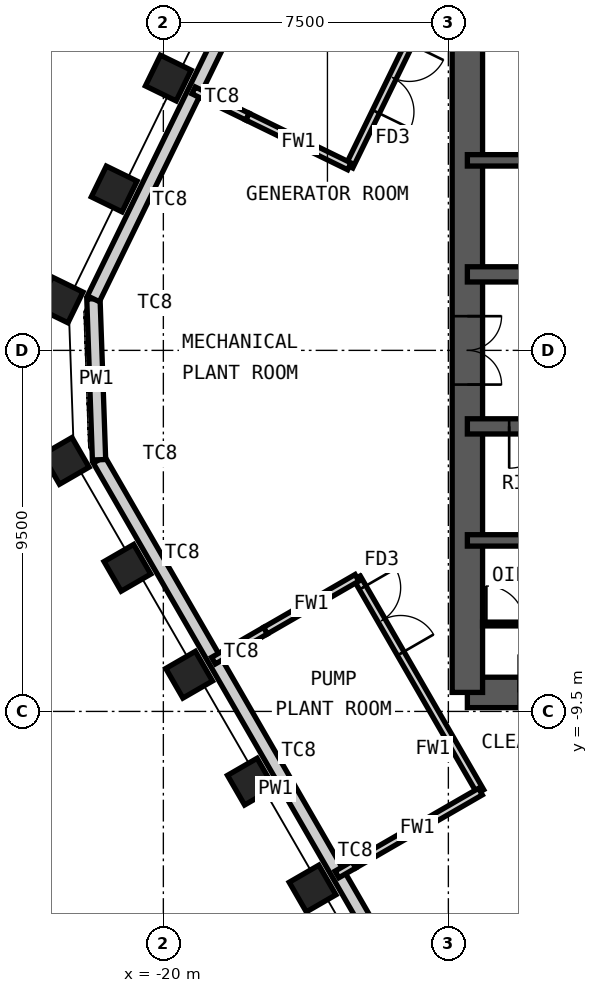
"""IFC4 building model, lengths in metres.
Left out: names, types, materials, properties, quantities, classifications, styles, units other than length and angle.
Written with IfcOpenShell. Run it as: python <this file> out.ifc"""

import sys

from ifc_helpers import new_model, si_unit, direction, frame, frame_2d, origin, origin_2d, place, context, subcontext, project, spatial, rectangle, hollow_rectangle, extrude, element, fill, save


model = new_model("IFC4")
c1 = context("Model", 3, precision=1e-05, world=origin(), true_north=direction((0.0, 1.0)))
c2 = subcontext(c1, "Body", "Model", "MODEL_VIEW")
j1 = project(units=[si_unit("LENGTHUNIT", "METRE"), si_unit("PLANEANGLEUNIT", "RADIAN")], contexts=[c1])
p1 = place(None, origin())
s1 = spatial("IfcSite", under=j1, at=p1, CompositionType="ELEMENT")
p2 = place(p1, origin())
s2 = spatial("IfcBuilding", under=s1, at=p2, CompositionType="ELEMENT")
p3 = place(p2, frame((0.0, 0.0, 343.6)))
s3 = spatial("IfcBuildingStorey", under=s2, at=p3, CompositionType="ELEMENT", Elevation=343.6)
for number, where, z_axis, x_axis in (
    (1, (-16.073, -14.16, 0.0), (0.0, 0.0, 1.0), (0.5, -0.866, 0.0)),
    (2, (-17.698, -11.347, 0.0), (0.0, 0.0, 1.0), (0.5, -0.866, 0.0)),
    (3, (-19.322, -8.534, 0.0), (0.0, 0.0, 1.0), (0.5, -0.866, 0.0)),
    (4, (-20.946, -5.721, 0.0), (0.0, 0.0, 1.0), (0.5, -0.866, 0.0)),
    (5, (-22.57, -2.908, 0.0), (0.0, 0.0, 1.0), (0.5, -0.866, 0.0)),
    (6, (-22.717, 1.327, 0.0), (0.0, 0.0, 1.0), (-0.438, -0.899, 0.0)),
    (7, (-21.293, 4.246, 0.0), (0.0, 0.0, 1.0), (-0.438, -0.899, 0.0)),
    (8, (-19.87, 7.166, 0.0), (0.0, 0.0, 1.0), (-0.438, -0.899, 0.0)),
):
    element("IfcColumn", number, at=place(p3, frame(where, z_axis=z_axis, x_axis=x_axis)), inside=s3, PredefinedType="COLUMN", context=c2, shape_type="SweptSolid", body=[
        extrude(hollow_rectangle(XDim=0.9, YDim=0.9, WallThickness=0.05, at=origin_2d()), origin(), (0.0, 0.0, 1.0), 4.65),
    ])
p4 = place(p3, frame((-12.0, -9.0, 0.0), z_axis=(0.0, 0.0, 1.0), x_axis=(1.0, 0.0, 0.0)))
e9 = element("IfcWall", 9, at=p4, inside=s3, PredefinedType="SHEAR", context=c2, shape_type="SweptSolid", body=[
    extrude(rectangle(XDim=24.0, YDim=0.8, at=frame_2d((12.0, 0.0))), origin(), (0.0, 0.0, 1.0), 4.65),
])
p5 = place(p4, frame((1.35, 0.0, 0.0)))
e10 = element("IfcOpeningElement", 10, at=p5, cuts=e9, PredefinedType="OPENING", context=c2, shape_type="SweptSolid", body=[
    extrude(rectangle(XDim=1.0, YDim=2.1, at=frame_2d((0.5, 1.05))), frame((0.0, 0.41, 0.0), z_axis=(0.0, -1.0, 0.0), x_axis=(1.0, 0.0, 0.0)), (0.0, 0.0, 1.0), 0.82),
])
p6 = place(p4, frame((5.325, 0.0, 0.0)))
e11 = element("IfcOpeningElement", 11, at=p6, cuts=e9, PredefinedType="OPENING", context=c2, shape_type="SweptSolid", body=[
    extrude(rectangle(XDim=1.15, YDim=2.1, at=frame_2d((0.575, 1.05))), frame((0.0, 0.41, 0.0), z_axis=(0.0, -1.0, 0.0), x_axis=(1.0, 0.0, 0.0)), (0.0, 0.0, 1.0), 0.82),
])
p7 = place(p4, frame((12.6, 0.0, 0.0)))
e12 = element("IfcOpeningElement", 12, at=p7, cuts=e9, PredefinedType="OPENING", context=c2, shape_type="SweptSolid", body=[
    extrude(rectangle(XDim=1.0, YDim=2.1, at=frame_2d((0.5, 1.05))), frame((0.0, 0.41, 0.0), z_axis=(0.0, -1.0, 0.0), x_axis=(1.0, 0.0, 0.0)), (0.0, 0.0, 1.0), 0.82),
])
p8 = place(p3, frame((-12.0, -9.0, 0.0), z_axis=(0.0, 0.0, 1.0), x_axis=(0.0, 1.0, 0.0)))
e13 = element("IfcWall", 13, at=p8, inside=s3, PredefinedType="SHEAR", context=c2, shape_type="SweptSolid", body=[
    extrude(rectangle(XDim=18.0, YDim=0.8, at=frame_2d((9.0, 0.0))), origin(), (0.0, 0.0, 1.0), 4.65),
])
p9 = place(p8, frame((8.1, 0.0, 0.0)))
e14 = element("IfcOpeningElement", 14, at=p9, cuts=e13, PredefinedType="OPENING", context=c2, shape_type="SweptSolid", body=[
    extrude(rectangle(XDim=1.8, YDim=2.1, at=frame_2d((0.9, 1.05))), frame((0.0, 0.41, 0.0), z_axis=(0.0, -1.0, 0.0), x_axis=(1.0, 0.0, 0.0)), (0.0, 0.0, 1.0), 0.82),
])
p10 = place(p3, frame((-12.0, 5.0, 0.0), z_axis=(0.0, 0.0, 1.0), x_axis=(1.0, 0.0, 0.0)))
e15 = element("IfcWall", 15, at=p10, inside=s3, PredefinedType="SHEAR", context=c2, shape_type="SweptSolid", body=[
    extrude(rectangle(XDim=24.0, YDim=0.3, at=frame_2d((12.0, 0.0))), origin(), (0.0, 0.0, 1.0), 4.65),
])
p11 = place(p3, frame((-12.0, 2.0, 0.0), z_axis=(0.0, 0.0, 1.0), x_axis=(1.0, 0.0, 0.0)))
e16 = element("IfcWall", 16, at=p11, inside=s3, PredefinedType="SHEAR", context=c2, shape_type="SweptSolid", body=[
    extrude(rectangle(XDim=24.0, YDim=0.4, at=frame_2d((12.0, 0.0))), origin(), (0.0, 0.0, 1.0), 4.65),
])
p12 = place(p11, frame((2.4, 0.0, 0.0)))
e17 = element("IfcOpeningElement", 17, at=p12, cuts=e16, PredefinedType="OPENING", context=c2, shape_type="SweptSolid", body=[
    extrude(rectangle(XDim=1.1, YDim=2.1, at=frame_2d((0.55, 1.05))), frame((0.0, 0.21, 0.0), z_axis=(0.0, -1.0, 0.0), x_axis=(1.0, 0.0, 0.0)), (0.0, 0.0, 1.0), 0.42),
])
p13 = place(p11, frame((22.0, 0.0, 0.0)))
e18 = element("IfcOpeningElement", 18, at=p13, cuts=e16, PredefinedType="OPENING", context=c2, shape_type="SweptSolid", body=[
    extrude(rectangle(XDim=1.1, YDim=2.1, at=frame_2d((0.55, 1.05))), frame((0.0, 0.21, 0.0), z_axis=(0.0, -1.0, 0.0), x_axis=(1.0, 0.0, 0.0)), (0.0, 0.0, 1.0), 0.42),
])
p14 = place(p11, frame((10.15, 0.0, 0.0)))
e19 = element("IfcOpeningElement", 19, at=p14, cuts=e16, PredefinedType="OPENING", context=c2, shape_type="SweptSolid", body=[
    extrude(rectangle(XDim=1.0, YDim=2.1, at=frame_2d((0.5, 1.05))), frame((0.0, 0.21, 0.0), z_axis=(0.0, -1.0, 0.0), x_axis=(1.0, 0.0, 0.0)), (0.0, 0.0, 1.0), 0.42),
])
p15 = place(p11, frame((6.9, 0.0, 0.0)))
e20 = element("IfcOpeningElement", 20, at=p15, cuts=e16, PredefinedType="OPENING", context=c2, shape_type="SweptSolid", body=[
    extrude(rectangle(XDim=1.0, YDim=2.1, at=frame_2d((0.5, 1.05))), frame((0.0, 0.21, 0.0), z_axis=(0.0, -1.0, 0.0), x_axis=(1.0, 0.0, 0.0)), (0.0, 0.0, 1.0), 0.42),
])
p16 = place(p11, frame((13.4, 0.0, 0.0)))
e21 = element("IfcOpeningElement", 21, at=p16, cuts=e16, PredefinedType="OPENING", context=c2, shape_type="SweptSolid", body=[
    extrude(rectangle(XDim=1.0, YDim=2.1, at=frame_2d((0.5, 1.05))), frame((0.0, 0.21, 0.0), z_axis=(0.0, -1.0, 0.0), x_axis=(1.0, 0.0, 0.0)), (0.0, 0.0, 1.0), 0.42),
])
p17 = place(p11, frame((16.2, 0.0, 0.0)))
e22 = element("IfcOpeningElement", 22, at=p17, cuts=e16, PredefinedType="OPENING", context=c2, shape_type="SweptSolid", body=[
    extrude(rectangle(XDim=1.0, YDim=2.1, at=frame_2d((0.5, 1.05))), frame((0.0, 0.21, 0.0), z_axis=(0.0, -1.0, 0.0), x_axis=(1.0, 0.0, 0.0)), (0.0, 0.0, 1.0), 0.42),
])
p18 = place(p11, frame((19.0, 0.0, 0.0)))
e23 = element("IfcOpeningElement", 23, at=p18, cuts=e16, PredefinedType="OPENING", context=c2, shape_type="SweptSolid", body=[
    extrude(rectangle(XDim=1.0, YDim=2.1, at=frame_2d((0.5, 1.05))), frame((0.0, 0.21, 0.0), z_axis=(0.0, -1.0, 0.0), x_axis=(1.0, 0.0, 0.0)), (0.0, 0.0, 1.0), 0.42),
])
p19 = place(p3, frame((-12.0, -2.0, 0.0), z_axis=(0.0, 0.0, 1.0), x_axis=(1.0, 0.0, 0.0)))
e24 = element("IfcWall", 24, at=p19, inside=s3, PredefinedType="SHEAR", context=c2, shape_type="SweptSolid", body=[
    extrude(rectangle(XDim=24.0, YDim=0.4, at=frame_2d((12.0, 0.0))), origin(), (0.0, 0.0, 1.0), 4.65),
])
p20 = place(p19, frame((1.1, 0.0, 0.0)))
e25 = element("IfcOpeningElement", 25, at=p20, cuts=e24, PredefinedType="OPENING", context=c2, shape_type="SweptSolid", body=[
    extrude(rectangle(XDim=1.1, YDim=2.1, at=frame_2d((0.55, 1.05))), frame((0.0, 0.21, 0.0), z_axis=(0.0, -1.0, 0.0), x_axis=(1.0, 0.0, 0.0)), (0.0, 0.0, 1.0), 0.42),
])
p21 = place(p19, frame((13.55, 0.0, 0.0)))
e26 = element("IfcOpeningElement", 26, at=p21, cuts=e24, PredefinedType="OPENING", context=c2, shape_type="SweptSolid", body=[
    extrude(rectangle(XDim=1.1, YDim=2.1, at=frame_2d((0.55, 1.05))), frame((0.0, 0.21, 0.0), z_axis=(0.0, -1.0, 0.0), x_axis=(1.0, 0.0, 0.0)), (0.0, 0.0, 1.0), 0.42),
])
p22 = place(p19, frame((20.7, 0.0, 0.0)))
e27 = element("IfcOpeningElement", 27, at=p22, cuts=e24, PredefinedType="OPENING", context=c2, shape_type="SweptSolid", body=[
    extrude(rectangle(XDim=1.1, YDim=2.1, at=frame_2d((0.55, 1.05))), frame((0.0, 0.21, 0.0), z_axis=(0.0, -1.0, 0.0), x_axis=(1.0, 0.0, 0.0)), (0.0, 0.0, 1.0), 0.42),
])
p23 = place(p19, frame((4.0, 0.0, 0.0)))
e28 = element("IfcOpeningElement", 28, at=p23, cuts=e24, PredefinedType="OPENING", context=c2, shape_type="SweptSolid", body=[
    extrude(rectangle(XDim=1.0, YDim=2.1, at=frame_2d((0.5, 1.05))), frame((0.0, 0.21, 0.0), z_axis=(0.0, -1.0, 0.0), x_axis=(1.0, 0.0, 0.0)), (0.0, 0.0, 1.0), 0.42),
])
p24 = place(p19, frame((6.8, 0.0, 0.0)))
e29 = element("IfcOpeningElement", 29, at=p24, cuts=e24, PredefinedType="OPENING", context=c2, shape_type="SweptSolid", body=[
    extrude(rectangle(XDim=1.0, YDim=2.1, at=frame_2d((0.5, 1.05))), frame((0.0, 0.21, 0.0), z_axis=(0.0, -1.0, 0.0), x_axis=(1.0, 0.0, 0.0)), (0.0, 0.0, 1.0), 0.42),
])
p25 = place(p19, frame((9.6, 0.0, 0.0)))
e30 = element("IfcOpeningElement", 30, at=p25, cuts=e24, PredefinedType="OPENING", context=c2, shape_type="SweptSolid", body=[
    extrude(rectangle(XDim=1.0, YDim=2.1, at=frame_2d((0.5, 1.05))), frame((0.0, 0.21, 0.0), z_axis=(0.0, -1.0, 0.0), x_axis=(1.0, 0.0, 0.0)), (0.0, 0.0, 1.0), 0.42),
])
p26 = place(p3, frame((-12.0, -5.0, 0.0), z_axis=(0.0, 0.0, 1.0), x_axis=(1.0, 0.0, 0.0)))
e31 = element("IfcWall", 31, at=p26, inside=s3, PredefinedType="SHEAR", context=c2, shape_type="SweptSolid", body=[
    extrude(rectangle(XDim=24.0, YDim=0.3, at=frame_2d((12.0, 0.0))), origin(), (0.0, 0.0, 1.0), 4.65),
])
p27 = place(p3, frame((-12.396, -18.979, 5.0), z_axis=(0.0, 0.0, 1.0), x_axis=(-0.500003221507, 0.866023543838, 0.0)))
e32 = element("IfcWall", 32, at=p27, inside=s3, PredefinedType="PARAPET", context=c2, shape_type="SweptSolid", body=[
    extrude(rectangle(XDim=18.592, YDim=0.35, at=frame_2d((9.296, 0.0))), origin(), (0.0, 0.0, 1.0), 1.2),
])
p28 = place(p3, frame((-21.692, -2.878, 5.0), z_axis=(0.0, 0.0, 1.0), x_axis=(-0.034851142499, 0.999392514414, 0.0)))
e33 = element("IfcWall", 33, at=p28, inside=s3, PredefinedType="PARAPET", context=c2, shape_type="SweptSolid", body=[
    extrude(rectangle(XDim=4.238, YDim=0.35, at=frame_2d((2.119, 0.0))), origin(), (0.0, 0.0, 1.0), 1.2),
])
p29 = place(p3, frame((-21.84, 1.358, 5.0), z_axis=(0.0, 0.0, 1.0), x_axis=(0.438362055296, 0.89879848046, 0.0)))
e34 = element("IfcWall", 34, at=p29, inside=s3, PredefinedType="PARAPET", context=c2, shape_type="SweptSolid", body=[
    extrude(rectangle(XDim=18.592, YDim=0.35, at=frame_2d((9.296, 0.0))), origin(), (0.0, 0.0, 1.0), 1.2),
])
p30 = place(p3, frame((-11.6, -7.2, 0.0), z_axis=(0.0, 0.0, 1.0), x_axis=(1.0, 0.0, 0.0)))
e35 = element("IfcWall", 35, at=p30, inside=s3, PredefinedType="PARTITIONING", context=c2, shape_type="SweptSolid", body=[
    extrude(rectangle(XDim=3.25, YDim=0.1, at=frame_2d((1.625, 0.0))), origin(), (0.0, 0.0, 1.0), 5.0),
])
p31 = place(p30, frame((0.1, 0.0, 0.0)))
e36 = element("IfcOpeningElement", 36, at=p31, cuts=e35, PredefinedType="OPENING", context=c2, shape_type="SweptSolid", body=[
    extrude(rectangle(XDim=1.0, YDim=2.4, at=frame_2d((0.5, 1.2))), frame((0.0, 0.06, 0.0), z_axis=(0.0, -1.0, 0.0), x_axis=(1.0, 0.0, 0.0)), (0.0, 0.0, 1.0), 0.12),
])
p32 = place(p3, frame((-15.433, -13.79, 0.0), z_axis=(0.0, 0.0, 1.0), x_axis=(0.866114856374, 0.499845031553, 0.0)))
e37 = element("IfcWall", 37, at=p32, inside=s3, PredefinedType="PARTITIONING", context=c2, shape_type="SweptSolid", body=[
    extrude(rectangle(XDim=0.517, YDim=0.2, at=frame_2d((0.259, 0.0))), origin(), (0.0, 0.0, 1.0), 3.75),
])
p33 = place(p3, frame((-18.681, -8.164, 0.0), z_axis=(0.0, 0.0, 1.0), x_axis=(0.866049315463, 0.499958581471, 0.0)))
e38 = element("IfcWall", 38, at=p33, inside=s3, PredefinedType="PARTITIONING", context=c2, shape_type="SweptSolid", body=[
    extrude(rectangle(XDim=1.581, YDim=0.2, at=frame_2d((0.791, 0.0))), origin(), (0.0, 0.0, 1.0), 3.75),
])
p34 = place(p3, frame((-11.657, -11.61, 0.0), z_axis=(0.0, 0.0, 1.0), x_axis=(-0.500003318956, 0.866023487576, 0.0)))
e39 = element("IfcWall", 39, at=p34, inside=s3, PredefinedType="PARTITIONING", context=c2, shape_type="SweptSolid", body=[
    extrude(rectangle(XDim=6.496, YDim=0.2, at=frame_2d((3.248, 0.0))), origin(), (0.0, 0.0, 1.0), 4.65),
])
p35 = place(p34, frame((4.197, 0.0, 0.0)))
e40 = element("IfcOpeningElement", 40, at=p35, cuts=e39, PredefinedType="OPENING", context=c2, shape_type="SweptSolid", body=[
    extrude(rectangle(XDim=2.0, YDim=2.4, at=frame_2d((1.0, 1.2))), frame((0.0, 0.11, 0.0), z_axis=(0.0, -1.0, 0.0), x_axis=(1.0, 0.0, 0.0)), (0.0, 0.0, 1.0), 0.22),
])
p36 = place(p3, frame((-19.205, 6.841, 0.0), z_axis=(0.0, 0.0, 1.0), x_axis=(0.898769929808, -0.438420589472, 0.0)))
e41 = element("IfcWall", 41, at=p36, inside=s3, PredefinedType="PARTITIONING", context=c2, shape_type="SweptSolid", body=[
    extrude(rectangle(XDim=1.581, YDim=0.2, at=frame_2d((0.791, 0.0))), origin(), (0.0, 0.0, 1.0), 3.75),
])
p37 = place(p3, frame((-15.106, 4.842, 0.0), z_axis=(0.0, 0.0, 1.0), x_axis=(0.438397716114, 0.898781087087, 0.0)))
e42 = element("IfcWall", 42, at=p37, inside=s3, PredefinedType="PARTITIONING", context=c2, shape_type="SweptSolid", body=[
    extrude(rectangle(XDim=6.496, YDim=0.2, at=frame_2d((3.248, 0.0))), origin(), (0.0, 0.0, 1.0), 4.65),
])
p38 = place(p37, frame((1.598, 0.0, 0.0)))
e43 = element("IfcOpeningElement", 43, at=p38, cuts=e42, PredefinedType="OPENING", context=c2, shape_type="SweptSolid", body=[
    extrude(rectangle(XDim=2.0, YDim=2.4, at=frame_2d((1.0, 1.2))), frame((0.0, 0.11, 0.0), z_axis=(0.0, -1.0, 0.0), x_axis=(1.0, 0.0, 0.0)), (0.0, 0.0, 1.0), 0.22),
])
p39 = place(p3, frame((-14.985, -13.531, 0.0), z_axis=(0.0, 0.0, 1.0), x_axis=(0.866021594059, 0.50000659858, 0.0)))
e44 = element("IfcWall", 44, at=p39, inside=s3, PredefinedType="PARTITIONING", context=c2, shape_type="SweptSolid", body=[
    extrude(rectangle(XDim=3.843, YDim=0.2, at=frame_2d((1.921, 0.0))), origin(), (0.0, 0.0, 1.0), 4.65),
])
p40 = place(p3, frame((-17.311, -7.374, 0.0), z_axis=(0.0, 0.0, 1.0), x_axis=(0.86602318214, 0.500003847982, 0.0)))
e45 = element("IfcWall", 45, at=p40, inside=s3, PredefinedType="PARTITIONING", context=c2, shape_type="SweptSolid", body=[
    extrude(rectangle(XDim=2.779, YDim=0.2, at=frame_2d((1.389, 0.0))), origin(), (0.0, 0.0, 1.0), 4.65),
])
p41 = place(p3, frame((-17.784, 6.148, 0.0), z_axis=(0.0, 0.0, 1.0), x_axis=(0.898792861198, -0.438373576598, 0.0)))
e46 = element("IfcWall", 46, at=p41, inside=s3, PredefinedType="PARTITIONING", context=c2, shape_type="SweptSolid", body=[
    extrude(rectangle(XDim=2.979, YDim=0.2, at=frame_2d((1.49, 0.0))), origin(), (0.0, 0.0, 1.0), 4.65),
])
p42 = place(p20, origin())
e47 = element("IfcDoor", 47, at=p42, inside=s3, OperationType="SINGLE_SWING_LEFT", PredefinedType="DOOR", context=c2, shape_type="SweptSolid", body=[
    extrude(rectangle(XDim=1.1, YDim=2.1, at=frame_2d((0.55, 1.05))), frame((0.0, 0.025, 0.0), z_axis=(0.0, -1.0, 0.0), x_axis=(1.0, 0.0, 0.0)), (0.0, 0.0, 1.0), 0.05),
])
fill(e25, e47)
p43 = place(p9, origin())
e48 = element("IfcDoor", 48, at=p43, inside=s3, OperationType="DOUBLE_DOOR_DOUBLE_SWING", PredefinedType="DOOR", context=c2, shape_type="SweptSolid", body=[
    extrude(rectangle(XDim=1.8, YDim=2.1, at=frame_2d((0.9, 1.05))), frame((0.0, 0.025, 0.0), z_axis=(0.0, -1.0, 0.0), x_axis=(1.0, 0.0, 0.0)), (0.0, 0.0, 1.0), 0.05),
])
fill(e14, e48)
p44 = place(p31, origin())
e49 = element("IfcDoor", 49, at=p44, inside=s3, OperationType="SINGLE_SWING_RIGHT", PredefinedType="DOOR", context=c2, shape_type="SweptSolid", body=[
    extrude(rectangle(XDim=1.0, YDim=2.4, at=frame_2d((0.5, 1.2))), frame((0.0, 0.025, 0.0), z_axis=(0.0, -1.0, 0.0), x_axis=(1.0, 0.0, 0.0)), (0.0, 0.0, 1.0), 0.05),
])
fill(e36, e49)
p45 = place(p35, origin())
e50 = element("IfcDoor", 50, at=p45, inside=s3, OperationType="DOUBLE_DOOR_DOUBLE_SWING", PredefinedType="DOOR", context=c2, shape_type="SweptSolid", body=[
    extrude(rectangle(XDim=2.0, YDim=2.4, at=frame_2d((1.0, 1.2))), frame((0.0, 0.025, 0.0), z_axis=(0.0, -1.0, 0.0), x_axis=(1.0, 0.0, 0.0)), (0.0, 0.0, 1.0), 0.05),
])
fill(e40, e50)
p46 = place(p38, origin())
e51 = element("IfcDoor", 51, at=p46, inside=s3, OperationType="DOUBLE_DOOR_DOUBLE_SWING", PredefinedType="DOOR", context=c2, shape_type="SweptSolid", body=[
    extrude(rectangle(XDim=2.0, YDim=2.4, at=frame_2d((1.0, 1.2))), frame((0.0, 0.025, 0.0), z_axis=(0.0, -1.0, 0.0), x_axis=(1.0, 0.0, 0.0)), (0.0, 0.0, 1.0), 0.05),
])
fill(e43, e51)
save(model, sys.argv[1])
